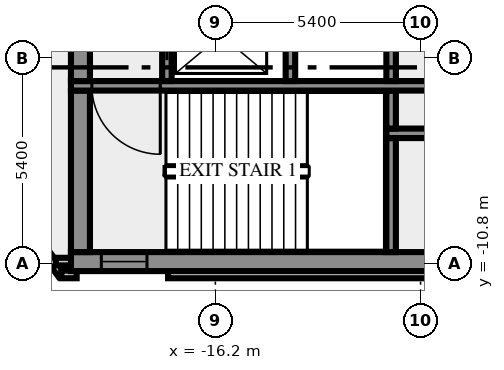
"""IFC4 building model, lengths in metres.
Left out: names, types, materials, properties, quantities, classifications, styles, units other than length and angle.
Written with IfcOpenShell. Run it as: python <this file> out.ifc"""

import sys

from ifc_helpers import new_model, si_unit, direction, frame, frame_2d, origin, place, context, subcontext, project, spatial, rectangle, extrude, element, fill, save


model = new_model("IFC4")
c1 = context("Model", 3, precision=1e-05, world=origin(), true_north=direction((0.0, 1.0)))
c2 = subcontext(c1, "Body", "Model", "MODEL_VIEW")
j1 = project(units=[si_unit("LENGTHUNIT", "METRE"), si_unit("PLANEANGLEUNIT", "RADIAN")], contexts=[c1])
p1 = place(None, origin())
s1 = spatial("IfcSite", under=j1, at=p1, CompositionType="ELEMENT")
p2 = place(p1, origin())
s2 = spatial("IfcBuilding", under=s1, at=p2, CompositionType="ELEMENT")
p3 = place(p2, frame((0.0, 0.0, 176.0)))
s3 = spatial("IfcBuildingStorey", under=s2, at=p3, CompositionType="ELEMENT", Elevation=176.0)
p4 = place(p3, frame((-21.833, -8.909, 0.0), z_axis=(0.0, 0.0, 1.0), x_axis=(0.587766567315, -0.809030569476, 0.0)))
e1 = element("IfcWall", 1, at=p4, inside=s3, PredefinedType="SOLIDWALL", context=c2, shape_type="SweptSolid", body=[
    extrude(rectangle(XDim=2.688, YDim=0.2, at=frame_2d((1.344, 0.0))), origin(), (0.0, 0.0, 1.0), 3.65),
])
p5 = place(p3, frame((-20.256, -11.088, 0.0), z_axis=(0.0, 0.0, 1.0), x_axis=(1.0, 0.0, 0.0)))
e2 = element("IfcWall", 2, at=p5, inside=s3, PredefinedType="SOLIDWALL", context=c2, shape_type="SweptSolid", body=[
    extrude(rectangle(XDim=0.406, YDim=0.2, at=frame_2d((0.203, 0.0))), origin(), (0.0, 0.0, 1.0), 3.65),
])
p6 = place(p3, frame((-17.444, -11.088, 0.0), z_axis=(0.0, 0.0, 1.0), x_axis=(1.0, 0.0, 0.0)))
e3 = element("IfcWall", 3, at=p6, inside=s3, PredefinedType="SOLIDWALL", context=c2, shape_type="SweptSolid", body=[
    extrude(rectangle(XDim=34.888, YDim=0.2, at=frame_2d((17.444, 0.0))), origin(), (0.0, 0.0, 1.0), 3.65),
])
p7 = place(p3, frame((-19.98, -10.75, 0.0), z_axis=(0.0, 0.0, 1.0), x_axis=(-1.0, 0.0, 0.0)))
e4 = element("IfcWall", 4, at=p7, inside=s3, PredefinedType="SOLIDWALL", context=c2, shape_type="SweptSolid", body=[
    extrude(rectangle(XDim=0.417, YDim=0.2, at=frame_2d((0.208, 0.0))), origin(), (0.0, 0.0, 1.0), 3.65),
])
p8 = place(p3, frame((-20.0, -10.75, 0.0), z_axis=(0.0, 0.0, 1.0), x_axis=(1.0, 0.0, 0.0)))
e5 = element("IfcWall", 5, at=p8, inside=s3, PredefinedType="SHEAR", context=c2, shape_type="SweptSolid", body=[
    extrude(rectangle(XDim=40.0, YDim=0.5, at=frame_2d((20.0, 0.0))), origin(), (0.0, 0.0, 1.0), 3.65),
])
p9 = place(p8, frame((0.8, 0.0, 1.0)))
e6 = element("IfcOpeningElement", 6, at=p9, cuts=e5, PredefinedType="OPENING", context=c2, shape_type="SweptSolid", body=[
    extrude(rectangle(XDim=1.2, YDim=1.2, at=frame_2d((0.6, 0.6))), frame((0.0, 0.26, 0.0), z_axis=(0.0, -1.0, 0.0), x_axis=(1.0, 0.0, 0.0)), (0.0, 0.0, 1.0), 0.52),
])
p10 = place(p8, frame((38.0, 0.0, 1.0)))
e7 = element("IfcOpeningElement", 7, at=p10, cuts=e5, PredefinedType="OPENING", context=c2, shape_type="SweptSolid", body=[
    extrude(rectangle(XDim=1.2, YDim=1.2, at=frame_2d((0.6, 0.6))), frame((0.0, 0.26, 0.0), z_axis=(0.0, -1.0, 0.0), x_axis=(1.0, 0.0, 0.0)), (0.0, 0.0, 1.0), 0.52),
])
p11 = place(p3, frame((-19.75, -10.5, 0.0), z_axis=(0.0, 0.0, 1.0), x_axis=(0.0, 1.0, 0.0)))
e8 = element("IfcWall", 8, at=p11, inside=s3, PredefinedType="SHEAR", context=c2, shape_type="SweptSolid", body=[
    extrude(rectangle(XDim=4.25, YDim=0.5, at=frame_2d((2.125, 0.0))), origin(), (0.0, 0.0, 1.0), 3.65),
])
p12 = place(p3, frame((-11.575, -10.5, 0.0), z_axis=(0.0, 0.0, 1.0), x_axis=(0.0, 1.0, 0.0)))
e9 = element("IfcWall", 9, at=p12, inside=s3, PredefinedType="SHEAR", context=c2, shape_type="SweptSolid", body=[
    extrude(rectangle(XDim=3.0, YDim=0.25, at=frame_2d((1.5, 0.0))), origin(), (0.0, 0.0, 1.0), 3.65),
])
p13 = place(p3, frame((11.7, -7.375, 0.0), z_axis=(0.0, 0.0, 1.0), x_axis=(-1.0, 0.0, 0.0)))
e10 = element("IfcWall", 10, at=p13, inside=s3, PredefinedType="SHEAR", context=c2, shape_type="SweptSolid", body=[
    extrude(rectangle(XDim=23.4, YDim=0.25, at=frame_2d((11.7, 0.0))), origin(), (0.0, 0.0, 1.0), 3.65),
])
p14 = place(p13, frame((20.213, 0.0, 0.0)))
e11 = element("IfcOpeningElement", 11, at=p14, cuts=e10, PredefinedType="OPENING", context=c2, shape_type="SweptSolid", body=[
    extrude(rectangle(XDim=0.9, YDim=2.1, at=frame_2d((0.45, 1.05))), frame((0.0, 0.135, 0.0), z_axis=(0.0, -1.0, 0.0), x_axis=(1.0, 0.0, 0.0)), (0.0, 0.0, 1.0), 0.27),
])
p15 = place(p13, frame((16.488, 0.0, 0.0)))
e12 = element("IfcOpeningElement", 12, at=p15, cuts=e10, PredefinedType="OPENING", context=c2, shape_type="SweptSolid", body=[
    extrude(rectangle(XDim=0.9, YDim=2.1, at=frame_2d((0.45, 1.05))), frame((0.0, 0.135, 0.0), z_axis=(0.0, -1.0, 0.0), x_axis=(1.0, 0.0, 0.0)), (0.0, 0.0, 1.0), 0.27),
])
p16 = place(p13, frame((14.45, 0.0, 0.0)))
e13 = element("IfcOpeningElement", 13, at=p16, cuts=e10, PredefinedType="OPENING", context=c2, shape_type="SweptSolid", body=[
    extrude(rectangle(XDim=0.9, YDim=2.1, at=frame_2d((0.45, 1.05))), frame((0.0, 0.135, 0.0), z_axis=(0.0, -1.0, 0.0), x_axis=(1.0, 0.0, 0.0)), (0.0, 0.0, 1.0), 0.27),
])
p17 = place(p13, frame((12.95, 0.0, 0.0)))
e14 = element("IfcOpeningElement", 14, at=p17, cuts=e10, PredefinedType="OPENING", context=c2, shape_type="SweptSolid", body=[
    extrude(rectangle(XDim=0.9, YDim=2.1, at=frame_2d((0.45, 1.05))), frame((0.0, 0.135, 0.0), z_axis=(0.0, -1.0, 0.0), x_axis=(1.0, 0.0, 0.0)), (0.0, 0.0, 1.0), 0.27),
])
p18 = place(p13, frame((11.475, 0.0, 0.0)))
e15 = element("IfcOpeningElement", 15, at=p18, cuts=e10, PredefinedType="OPENING", context=c2, shape_type="SweptSolid", body=[
    extrude(rectangle(XDim=0.9, YDim=2.1, at=frame_2d((0.45, 1.05))), frame((0.0, 0.135, 0.0), z_axis=(0.0, -1.0, 0.0), x_axis=(1.0, 0.0, 0.0)), (0.0, 0.0, 1.0), 0.27),
])
p19 = place(p13, frame((10.45, 0.0, 0.0)))
e16 = element("IfcOpeningElement", 16, at=p19, cuts=e10, PredefinedType="OPENING", context=c2, shape_type="SweptSolid", body=[
    extrude(rectangle(XDim=0.5, YDim=2.1, at=frame_2d((0.25, 1.05))), frame((0.0, 0.135, 0.0), z_axis=(0.0, -1.0, 0.0), x_axis=(1.0, 0.0, 0.0)), (0.0, 0.0, 1.0), 0.27),
])
p20 = place(p13, frame((8.35, 0.0, 0.0)))
e17 = element("IfcOpeningElement", 17, at=p20, cuts=e10, PredefinedType="OPENING", context=c2, shape_type="SweptSolid", body=[
    extrude(rectangle(XDim=1.1, YDim=2.1, at=frame_2d((0.55, 1.05))), frame((0.0, 0.135, 0.0), z_axis=(0.0, -1.0, 0.0), x_axis=(1.0, 0.0, 0.0)), (0.0, 0.0, 1.0), 0.27),
])
p21 = place(p13, frame((5.85, 0.0, 0.0)))
e18 = element("IfcOpeningElement", 18, at=p21, cuts=e10, PredefinedType="OPENING", context=c2, shape_type="SweptSolid", body=[
    extrude(rectangle(XDim=1.1, YDim=2.1, at=frame_2d((0.55, 1.05))), frame((0.0, 0.135, 0.0), z_axis=(0.0, -1.0, 0.0), x_axis=(1.0, 0.0, 0.0)), (0.0, 0.0, 1.0), 0.27),
])
p22 = place(p13, frame((3.35, 0.0, 0.0)))
e19 = element("IfcOpeningElement", 19, at=p22, cuts=e10, PredefinedType="OPENING", context=c2, shape_type="SweptSolid", body=[
    extrude(rectangle(XDim=1.1, YDim=2.1, at=frame_2d((0.55, 1.05))), frame((0.0, 0.135, 0.0), z_axis=(0.0, -1.0, 0.0), x_axis=(1.0, 0.0, 0.0)), (0.0, 0.0, 1.0), 0.27),
])
p23 = place(p13, frame((0.85, 0.0, 0.0)))
e20 = element("IfcOpeningElement", 20, at=p23, cuts=e10, PredefinedType="OPENING", context=c2, shape_type="SweptSolid", body=[
    extrude(rectangle(XDim=1.1, YDim=2.1, at=frame_2d((0.55, 1.05))), frame((0.0, 0.135, 0.0), z_axis=(0.0, -1.0, 0.0), x_axis=(1.0, 0.0, 0.0)), (0.0, 0.0, 1.0), 0.27),
])
p24 = place(p3, frame((-11.575, -7.25, 0.0), z_axis=(0.0, 0.0, 1.0), x_axis=(0.0, 1.0, 0.0)))
e21 = element("IfcWall", 21, at=p24, inside=s3, PredefinedType="SHEAR", context=c2, shape_type="SweptSolid", body=[
    extrude(rectangle(XDim=1.0, YDim=0.25, at=frame_2d((0.5, 0.0))), origin(), (0.0, 0.0, 1.0), 3.65),
])
p25 = place(p3, frame((-9.8, -6.125, 0.0), z_axis=(0.0, 0.0, 1.0), x_axis=(-1.0, 0.0, 0.0)))
e22 = element("IfcWall", 22, at=p25, inside=s3, PredefinedType="SHEAR", context=c2, shape_type="SweptSolid", body=[
    extrude(rectangle(XDim=10.2, YDim=0.25, at=frame_2d((5.1, 0.0))), origin(), (0.0, 0.0, 1.0), 3.65),
])
p26 = place(p25, frame((7.85, 0.0, 0.0)))
e23 = element("IfcOpeningElement", 23, at=p26, cuts=e22, PredefinedType="OPENING", context=c2, shape_type="SweptSolid", body=[
    extrude(rectangle(XDim=1.8, YDim=2.1, at=frame_2d((0.9, 1.05))), frame((0.0, 0.135, 0.0), z_axis=(0.0, -1.0, 0.0), x_axis=(1.0, 0.0, 0.0)), (0.0, 0.0, 1.0), 0.27),
])
p27 = place(p3, frame((-19.75, -6.0, 0.0), z_axis=(0.0, 0.0, 1.0), x_axis=(0.0, 1.0, 0.0)))
e24 = element("IfcWall", 24, at=p27, inside=s3, PredefinedType="SHEAR", context=c2, shape_type="SweptSolid", body=[
    extrude(rectangle(XDim=4.3, YDim=0.5, at=frame_2d((2.15, 0.0))), origin(), (0.0, 0.0, 1.0), 3.65),
])
p28 = place(p3, frame((-17.475, -6.0, 0.0), z_axis=(0.0, 0.0, 1.0), x_axis=(0.0, 1.0, 0.0)))
e25 = element("IfcWall", 25, at=p28, inside=s3, PredefinedType="SHEAR", context=c2, shape_type="SweptSolid", body=[
    extrude(rectangle(XDim=4.3, YDim=0.25, at=frame_2d((2.15, 0.0))), origin(), (0.0, 0.0, 1.0), 3.65),
])
p29 = place(p28, frame((0.55, 0.0, 0.0)))
e26 = element("IfcOpeningElement", 26, at=p29, cuts=e25, PredefinedType="OPENING", context=c2, shape_type="SweptSolid", body=[
    extrude(rectangle(XDim=1.3, YDim=2.1, at=frame_2d((0.65, 1.05))), frame((0.0, 0.135, 0.0), z_axis=(0.0, -1.0, 0.0), x_axis=(1.0, 0.0, 0.0)), (0.0, 0.0, 1.0), 0.27),
])
for number, where, z_axis, x_axis in (
    (27, (-14.225, -6.0, 0.0), (0.0, 0.0, 1.0), (0.0, 1.0, 0.0)),
    (28, (-11.575, -6.0, 0.0), (0.0, 0.0, 1.0), (0.0, 1.0, 0.0)),
):
    element("IfcWall", number, at=place(p3, frame(where, z_axis=z_axis, x_axis=x_axis)), inside=s3, PredefinedType="SHEAR", context=c2, shape_type="SweptSolid", body=[
        extrude(rectangle(XDim=1.75, YDim=0.25, at=frame_2d((0.875, 0.0))), origin(), (0.0, 0.0, 1.0), 3.65),
    ])
p30 = place(p9, origin())
e29 = element("IfcWindow", 29, at=p30, inside=s3, PartitioningType="SINGLE_PANEL", PredefinedType="WINDOW", context=c2, shape_type="SweptSolid", body=[
    extrude(rectangle(XDim=1.2, YDim=1.2, at=frame_2d((0.6, 0.6))), frame((0.0, 0.03, 0.0), z_axis=(0.0, -1.0, 0.0), x_axis=(1.0, 0.0, 0.0)), (0.0, 0.0, 1.0), 0.06),
])
fill(e6, e29)
p31 = place(p26, origin())
e30 = element("IfcDoor", 30, at=p31, inside=s3, OperationType="DOUBLE_DOOR_SINGLE_SWING", PredefinedType="DOOR", context=c2, shape_type="SweptSolid", body=[
    extrude(rectangle(XDim=1.8, YDim=2.1, at=frame_2d((0.9, 1.05))), frame((0.0, 0.025, 0.0), z_axis=(0.0, -1.0, 0.0), x_axis=(1.0, 0.0, 0.0)), (0.0, 0.0, 1.0), 0.05),
])
fill(e23, e30)
p32 = place(p29, origin())
e31 = element("IfcDoor", 31, at=p32, inside=s3, OperationType="DOUBLE_DOOR_SLIDING", PredefinedType="DOOR", context=c2, shape_type="SweptSolid", body=[
    extrude(rectangle(XDim=1.3, YDim=2.1, at=frame_2d((0.65, 1.05))), frame((0.0, 0.025, 0.0), z_axis=(0.0, -1.0, 0.0), x_axis=(1.0, 0.0, 0.0)), (0.0, 0.0, 1.0), 0.05),
])
fill(e26, e31)
save(model, sys.argv[1])
